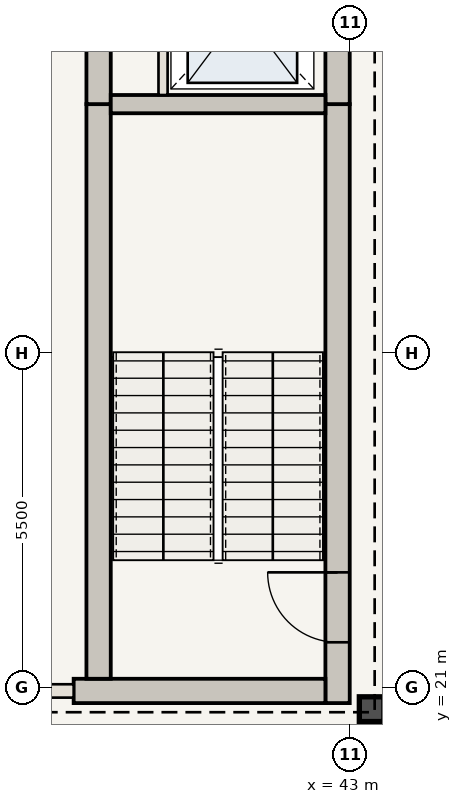
"""IFC4 building model, lengths in metres.
Left out: names, types, materials, properties, quantities, classifications, styles, units other than length and angle.
Written with IfcOpenShell. Run it as: python <this file> out.ifc"""

import sys

from ifc_helpers import new_model, si_unit, direction, frame, frame_2d, origin, origin_2d, place, context, subcontext, project, spatial, rectangle, i_section, extrude, element, fill, save


model = new_model("IFC4")
c1 = context("Model", 3, precision=1e-05, world=origin(), true_north=direction((0.0, 1.0)))
c2 = subcontext(c1, "Body", "Model", "MODEL_VIEW")
j1 = project(units=[si_unit("LENGTHUNIT", "METRE"), si_unit("PLANEANGLEUNIT", "RADIAN")], contexts=[c1])
p1 = place(None, origin())
s1 = spatial("IfcSite", under=j1, at=p1, CompositionType="ELEMENT")
p2 = place(p1, origin())
s2 = spatial("IfcBuilding", under=s1, at=p2, CompositionType="ELEMENT")
p3 = place(p2, frame((0.0, 0.0, 317.8)))
s3 = spatial("IfcBuildingStorey", under=s2, at=p3, CompositionType="ELEMENT", Elevation=317.8)
p4 = place(p3, frame((42.79, 20.75, 0.0), z_axis=(0.0, 0.0, 1.0), x_axis=(0.0, 1.0, 0.0)))
e1 = element("IfcWall", 1, at=p4, inside=s3, PredefinedType="SHEAR", context=c2, shape_type="SweptSolid", body=[
    extrude(rectangle(XDim=9.85, YDim=0.4, at=frame_2d((4.925, 0.0))), origin(), (0.0, 0.0, 1.0), 4.55),
])
p5 = place(p4, frame((1.0, 0.0, 0.0)))
e2 = element("IfcOpeningElement", 2, at=p5, cuts=e1, PredefinedType="OPENING", context=c2, shape_type="SweptSolid", body=[
    extrude(rectangle(XDim=1.15, YDim=2.15, at=frame_2d((0.575, 1.075))), frame((0.0, 0.21, 0.0), z_axis=(0.0, -1.0, 0.0), x_axis=(1.0, 0.0, 0.0)), (0.0, 0.0, 1.0), 0.42),
])
p6 = place(p3, frame((42.79, 30.6, 0.0), z_axis=(0.0, 0.0, 1.0), x_axis=(0.0, 1.0, 0.0)))
e3 = element("IfcWall", 3, at=p6, inside=s3, PredefinedType="SHEAR", context=c2, shape_type="SweptSolid", body=[
    extrude(rectangle(XDim=12.6, YDim=0.4, at=frame_2d((6.3, 0.0))), origin(), (0.0, 0.0, 1.0), 4.55),
])
p7 = place(p6, frame((4.2, 0.0, 0.0)))
e4 = element("IfcOpeningElement", 4, at=p7, cuts=e3, PredefinedType="OPENING", context=c2, shape_type="SweptSolid", body=[
    extrude(rectangle(XDim=1.1, YDim=2.15, at=frame_2d((0.55, 1.075))), frame((0.0, 0.21, 0.0), z_axis=(0.0, -1.0, 0.0), x_axis=(1.0, 0.0, 0.0)), (0.0, 0.0, 1.0), 0.42),
])
p8 = place(p6, frame((8.4, 0.0, 0.0)))
e5 = element("IfcOpeningElement", 5, at=p8, cuts=e3, PredefinedType="OPENING", context=c2, shape_type="SweptSolid", body=[
    extrude(rectangle(XDim=0.88, YDim=2.1, at=frame_2d((0.44, 1.05))), frame((0.0, 0.21, 0.0), z_axis=(0.0, -1.0, 0.0), x_axis=(1.0, 0.0, 0.0)), (0.0, 0.0, 1.0), 0.42),
])
p9 = place(p6, frame((10.5, 0.0, 0.0)))
e6 = element("IfcOpeningElement", 6, at=p9, cuts=e3, PredefinedType="OPENING", context=c2, shape_type="SweptSolid", body=[
    extrude(rectangle(XDim=0.88, YDim=2.1, at=frame_2d((0.44, 1.05))), frame((0.0, 0.21, 0.0), z_axis=(0.0, -1.0, 0.0), x_axis=(1.0, 0.0, 0.0)), (0.0, 0.0, 1.0), 0.42),
])
p10 = place(p3, frame((38.45, 20.95, 0.0), z_axis=(0.0, 0.0, 1.0), x_axis=(1.0, 0.0, 0.0)))
e7 = element("IfcWall", 7, at=p10, inside=s3, PredefinedType="SHEAR", context=c2, shape_type="SweptSolid", body=[
    extrude(rectangle(XDim=4.14, YDim=0.4, at=frame_2d((2.07, 0.0))), origin(), (0.0, 0.0, 1.0), 4.55),
])
p11 = place(p3, frame((38.86, 21.15, 0.0), z_axis=(0.0, 0.0, 1.0), x_axis=(0.0, 1.0, 0.0)))
e8 = element("IfcWall", 8, at=p11, inside=s3, PredefinedType="SHEAR", context=c2, shape_type="SweptSolid", body=[
    extrude(rectangle(XDim=9.45, YDim=0.4, at=frame_2d((4.725, 0.0))), origin(), (0.0, 0.0, 1.0), 4.55),
])
p12 = place(p3, frame((38.86, 30.6, 0.0), z_axis=(0.0, 0.0, 1.0), x_axis=(0.0, 1.0, 0.0)))
e9 = element("IfcWall", 9, at=p12, inside=s3, PredefinedType="SHEAR", context=c2, shape_type="SweptSolid", body=[
    extrude(rectangle(XDim=12.2, YDim=0.4, at=frame_2d((6.1, 0.0))), origin(), (0.0, 0.0, 1.0), 4.55),
])
p13 = place(p3, frame((43.35, 20.65, 0.0), z_axis=(0.0, 0.0, 1.0), x_axis=(1.0, 0.0, 0.0)))
e10 = element("IfcColumn", 10, at=p13, inside=s3, PredefinedType="COLUMN", context=c2, shape_type="SweptSolid", body=[
    extrude(i_section(OverallWidth=0.404, OverallDepth=0.407, WebThickness=0.027, FlangeThickness=0.044, at=origin_2d()), origin(), (0.0, 0.0, 1.0), 4.55),
])
p14 = place(p3, frame((39.06, 30.6, 0.0), z_axis=(0.0, 0.0, 1.0), x_axis=(1.0, 0.0, 0.0)))
e11 = element("IfcWall", 11, at=p14, inside=s3, PredefinedType="SHEAR", context=c2, shape_type="SweptSolid", body=[
    extrude(rectangle(XDim=3.53, YDim=0.3, at=frame_2d((1.765, 0.0))), origin(), (0.0, 0.0, 1.0), 4.29),
])
p15 = place(p3, frame((39.92, 30.75, 0.0), z_axis=(0.0, 0.0, 1.0), x_axis=(0.0, 1.0, 0.0)))
e12 = element("IfcWall", 12, at=p15, inside=s3, PredefinedType="STANDARD", context=c2, shape_type="SweptSolid", body=[
    extrude(rectangle(XDim=2.65, YDim=0.15, at=frame_2d((1.325, 0.0))), origin(), (0.0, 0.0, 1.0), 4.29),
])
p16 = place(p3, frame((35.15, 20.95, 0.0), z_axis=(0.0, 0.0, 1.0), x_axis=(1.0, 0.0, 0.0)))
e13 = element("IfcWall", 13, at=p16, inside=s3, PredefinedType="STANDARD", context=c2, shape_type="SweptSolid", body=[
    extrude(rectangle(XDim=3.3, YDim=0.22, at=frame_2d((1.65, 0.0))), origin(), (0.0, 0.0, 1.0), 4.29),
])
p17 = place(p16, frame((1.1, 0.0, 0.0)))
e14 = element("IfcOpeningElement", 14, at=p17, cuts=e13, PredefinedType="OPENING", context=c2, shape_type="SweptSolid", body=[
    extrude(rectangle(XDim=1.1, YDim=2.15, at=frame_2d((0.55, 1.075))), frame((0.0, 0.12, 0.0), z_axis=(0.0, -1.0, 0.0), x_axis=(1.0, 0.0, 0.0)), (0.0, 0.0, 1.0), 0.24),
])
p18 = place(p5, origin())
e15 = element("IfcDoor", 15, at=p18, inside=s3, OperationType="SINGLE_SWING_RIGHT", PredefinedType="DOOR", context=c2, shape_type="SweptSolid", body=[
    extrude(rectangle(XDim=1.15, YDim=2.15, at=frame_2d((0.575, 1.075))), frame((0.0, 0.025, 0.0), z_axis=(0.0, -1.0, 0.0), x_axis=(1.0, 0.0, 0.0)), (0.0, 0.0, 1.0), 0.05),
])
fill(e2, e15)
save(model, sys.argv[1])
